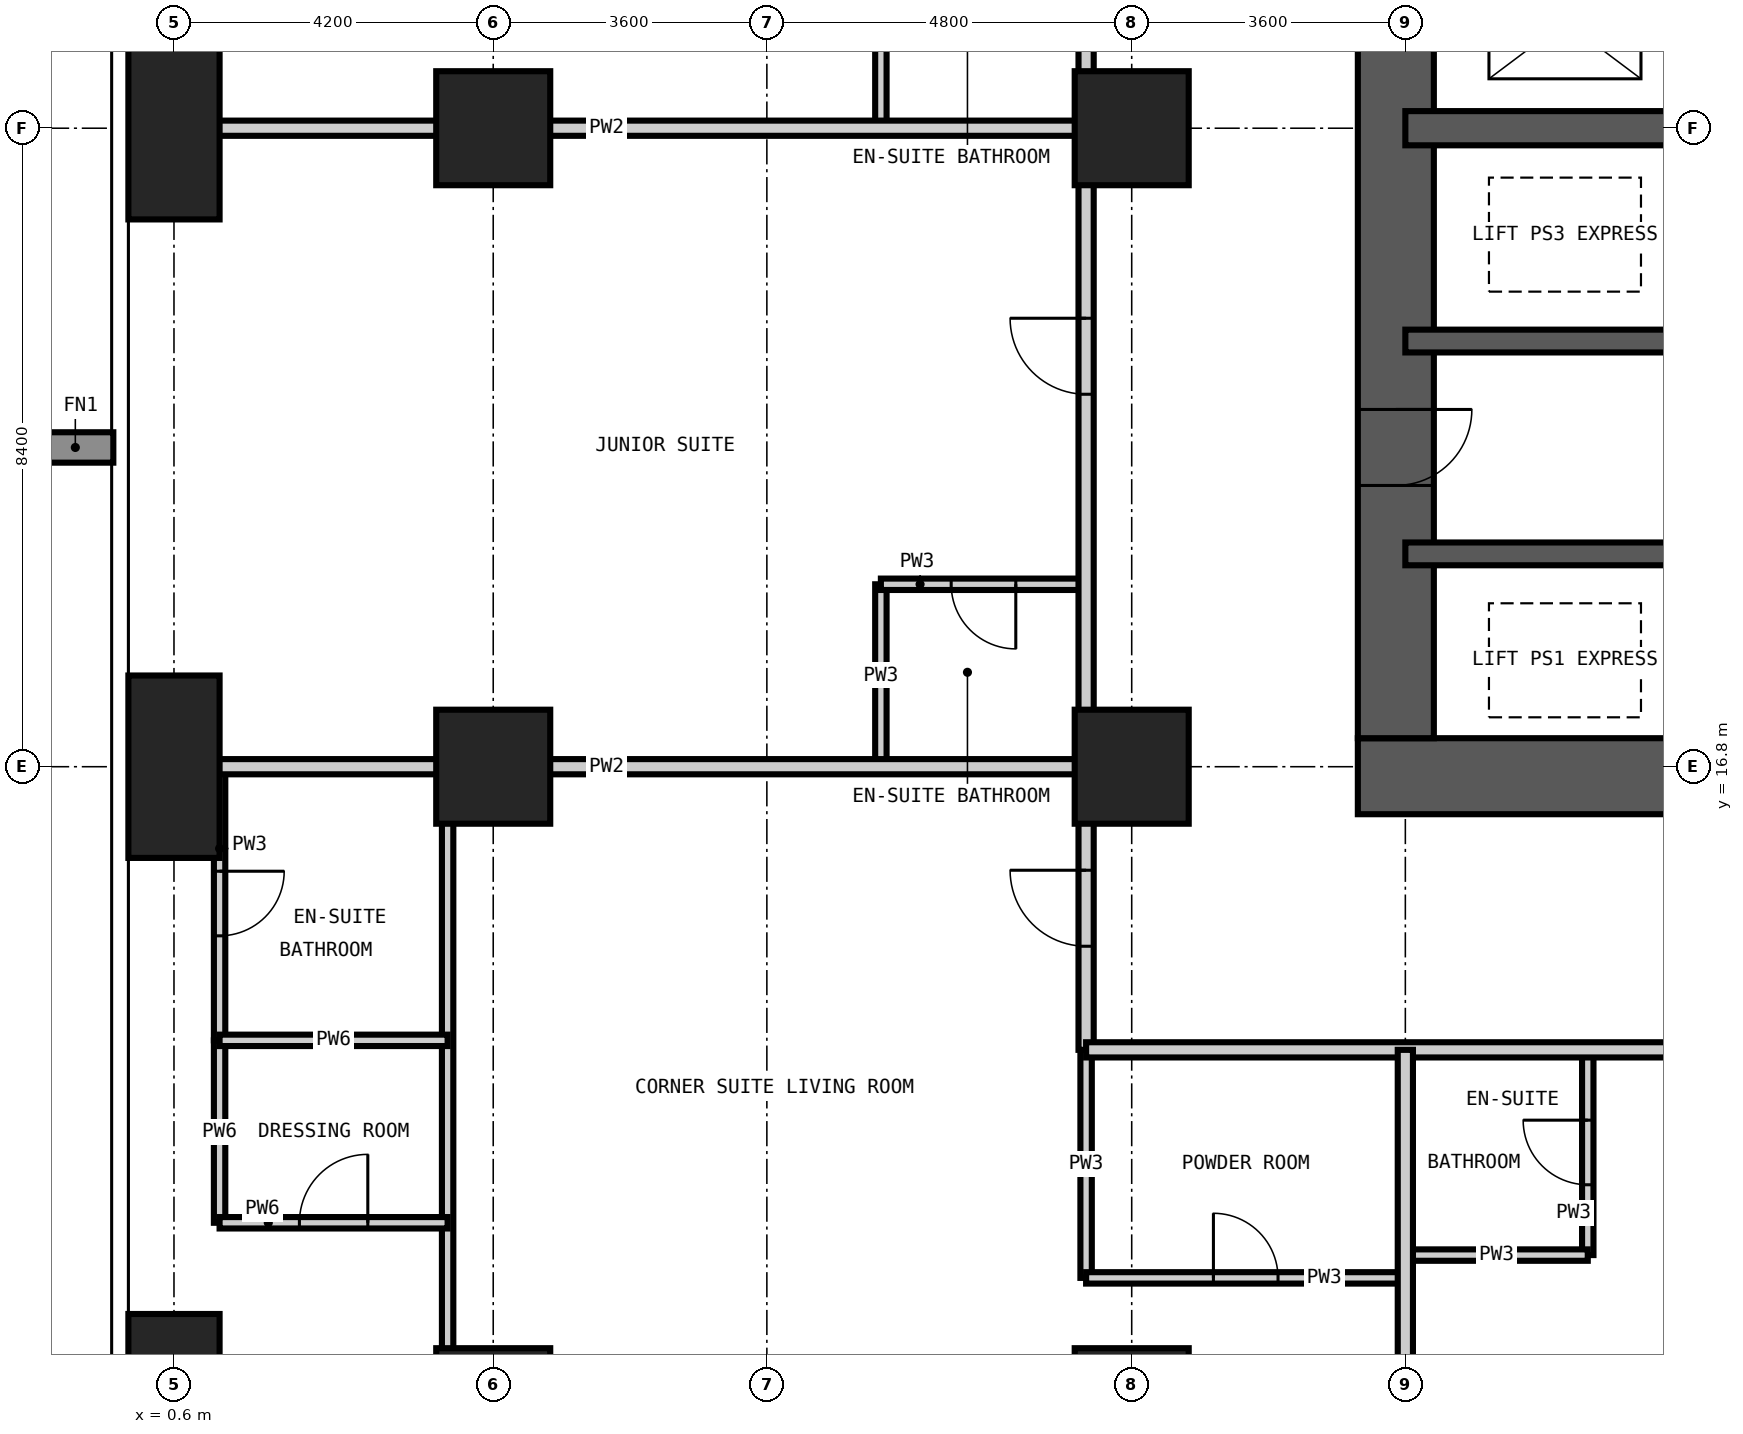
"""IFC4 building model, lengths in metres.
Left out: names, types, materials, properties, quantities, classifications, styles, units other than length and angle.
Written with IfcOpenShell. Run it as: python <this file> out.ifc"""

import sys

from ifc_helpers import new_model, si_unit, direction, frame, frame_2d, origin, origin_2d, place, context, subcontext, project, spatial, rectangle, extrude, element, fill, save


model = new_model("IFC4")
c1 = context("Model", 3, precision=1e-05, world=origin(), true_north=direction((0.0, 1.0)))
c2 = subcontext(c1, "Body", "Model", "MODEL_VIEW")
j1 = project(units=[si_unit("LENGTHUNIT", "METRE"), si_unit("PLANEANGLEUNIT", "RADIAN")], contexts=[c1])
p1 = place(None, origin())
s1 = spatial("IfcSite", under=j1, at=p1, CompositionType="ELEMENT")
p2 = place(p1, origin())
s2 = spatial("IfcBuilding", under=s1, at=p2, CompositionType="ELEMENT")
p3 = place(p2, frame((0.0, 0.0, 118.8)))
s3 = spatial("IfcBuildingStorey", under=s2, at=p3, CompositionType="ELEMENT", Elevation=118.8)
for number, where, z_axis, x_axis in (
    (1, (0.6, 8.4, -0.35), (0.0, 0.0, 1.0), (1.0, 0.0, 0.0)),
    (2, (0.6, 16.8, -0.35), (0.0, 0.0, 1.0), (1.0, 0.0, 0.0)),
    (3, (0.6, 25.2, -0.35), (0.0, 0.0, 1.0), (1.0, 0.0, 0.0)),
):
    element("IfcColumn", number, at=place(p3, frame(where, z_axis=z_axis, x_axis=x_axis)), inside=s3, PredefinedType="COLUMN", context=c2, shape_type="SweptSolid", body=[
        extrude(rectangle(XDim=1.2, YDim=2.4, at=origin_2d()), origin(), (0.0, 0.0, 1.0), 3.6),
    ])
for number, where, z_axis, x_axis in (
    (4, (4.8, 8.4, -0.35), (0.0, 0.0, 1.0), (1.0, 0.0, 0.0)),
    (5, (4.8, 16.8, -0.35), (0.0, 0.0, 1.0), (1.0, 0.0, 0.0)),
    (6, (4.8, 25.2, -0.35), (0.0, 0.0, 1.0), (1.0, 0.0, 0.0)),
    (7, (13.2, 8.4, -0.35), (0.0, 0.0, 1.0), (1.0, 0.0, 0.0)),
    (8, (13.2, 16.8, -0.35), (0.0, 0.0, 1.0), (1.0, 0.0, 0.0)),
    (9, (13.2, 25.2, -0.35), (0.0, 0.0, 1.0), (1.0, 0.0, 0.0)),
):
    element("IfcColumn", number, at=place(p3, frame(where, z_axis=z_axis, x_axis=x_axis)), inside=s3, PredefinedType="COLUMN", context=c2, shape_type="SweptSolid", body=[
        extrude(rectangle(XDim=1.5, YDim=1.5, at=origin_2d()), origin(), (0.0, 0.0, 1.0), 3.6),
    ])
p4 = place(p3, frame((16.175, 16.675, -0.35), z_axis=(0.0, 0.0, 1.0), x_axis=(1.0, 0.0, 0.0)))
e10 = element("IfcWall", 10, at=p4, inside=s3, PredefinedType="SHEAR", context=c2, shape_type="SweptSolid", body=[
    extrude(rectangle(XDim=26.45, YDim=1.0, at=frame_2d((13.225, 0.0))), origin(), (0.0, 0.0, 1.0), 3.6),
])
p5 = place(p4, frame((12.725, 0.0, 0.35)))
e11 = element("IfcOpeningElement", 11, at=p5, cuts=e10, PredefinedType="OPENING", context=c2, shape_type="SweptSolid", body=[
    extrude(rectangle(XDim=1.0, YDim=2.1, at=frame_2d((0.5, 1.05))), frame((0.0, 0.51, 0.0), z_axis=(0.0, -1.0, 0.0), x_axis=(1.0, 0.0, 0.0)), (0.0, 0.0, 1.0), 1.02),
])
p6 = place(p4, frame((19.025, 0.0, 0.35)))
e12 = element("IfcOpeningElement", 12, at=p6, cuts=e10, PredefinedType="OPENING", context=c2, shape_type="SweptSolid", body=[
    extrude(rectangle(XDim=1.0, YDim=2.1, at=frame_2d((0.5, 1.05))), frame((0.0, 0.51, 0.0), z_axis=(0.0, -1.0, 0.0), x_axis=(1.0, 0.0, 0.0)), (0.0, 0.0, 1.0), 1.02),
])
p7 = place(p3, frame((16.675, 41.625, -0.35), z_axis=(0.0, 0.0, 1.0), x_axis=(0.0, -1.0, 0.0)))
e13 = element("IfcWall", 13, at=p7, inside=s3, PredefinedType="SHEAR", context=c2, shape_type="SweptSolid", body=[
    extrude(rectangle(XDim=24.45, YDim=1.0, at=frame_2d((12.225, 0.0))), origin(), (0.0, 0.0, 1.0), 3.6),
])
p8 = place(p7, frame((11.325, 0.0, 0.35)))
e14 = element("IfcOpeningElement", 14, at=p8, cuts=e13, PredefinedType="OPENING", context=c2, shape_type="SweptSolid", body=[
    extrude(rectangle(XDim=1.8, YDim=2.2, at=frame_2d((0.9, 1.1))), frame((0.0, 0.51, 0.0), z_axis=(0.0, -1.0, 0.0), x_axis=(1.0, 0.0, 0.0)), (0.0, 0.0, 1.0), 1.02),
])
p9 = place(p7, frame((20.125, 0.0, 0.35)))
e15 = element("IfcOpeningElement", 15, at=p9, cuts=e13, PredefinedType="OPENING", context=c2, shape_type="SweptSolid", body=[
    extrude(rectangle(XDim=1.0, YDim=2.1, at=frame_2d((0.5, 1.05))), frame((0.0, 0.51, 0.0), z_axis=(0.0, -1.0, 0.0), x_axis=(1.0, 0.0, 0.0)), (0.0, 0.0, 1.0), 1.02),
])
p10 = place(p7, frame((5.425, 0.0, 0.35)))
e16 = element("IfcOpeningElement", 16, at=p10, cuts=e13, PredefinedType="OPENING", context=c2, shape_type="SweptSolid", body=[
    extrude(rectangle(XDim=1.0, YDim=2.1, at=frame_2d((0.5, 1.05))), frame((0.0, 0.51, 0.0), z_axis=(0.0, -1.0, 0.0), x_axis=(1.0, 0.0, 0.0)), (0.0, 0.0, 1.0), 1.02),
])
for number, where, z_axis, x_axis in (
    (17, (16.8, 19.6, -0.35), (0.0, 0.0, 1.0), (1.0, 0.0, 0.0)),
    (18, (16.8, 22.4, -0.35), (0.0, 0.0, 1.0), (1.0, 0.0, 0.0)),
):
    element("IfcWall", number, at=place(p3, frame(where, z_axis=z_axis, x_axis=x_axis)), inside=s3, PredefinedType="SHEAR", context=c2, shape_type="SweptSolid", body=[
        extrude(rectangle(XDim=8.4, YDim=0.3, at=frame_2d((4.2, 0.0))), origin(), (0.0, 0.0, 1.0), 3.6),
    ])
p11 = place(p3, frame((16.8, 25.2, -0.35), z_axis=(0.0, 0.0, 1.0), x_axis=(1.0, 0.0, 0.0)))
e19 = element("IfcWall", 19, at=p11, inside=s3, PredefinedType="SHEAR", context=c2, shape_type="SweptSolid", body=[
    extrude(rectangle(XDim=25.2, YDim=0.45, at=frame_2d((12.6, 0.0))), origin(), (0.0, 0.0, 1.0), 3.6),
])
p12 = place(p3, frame((1.2, 13.2, 0.0), z_axis=(0.0, 0.0, 1.0), x_axis=(0.0, 1.0, 0.0)))
e20 = element("IfcWall", 20, at=p12, inside=s3, PredefinedType="PARTITIONING", context=c2, shape_type="SweptSolid", body=[
    extrude(rectangle(XDim=3.6, YDim=0.15, at=frame_2d((1.8, 0.0))), origin(), (0.0, 0.0, 1.0), 3.25),
])
p13 = place(p12, frame((1.375, 0.0, 0.0)))
e21 = element("IfcOpeningElement", 21, at=p13, cuts=e20, PredefinedType="OPENING", context=c2, shape_type="SweptSolid", body=[
    extrude(rectangle(XDim=0.85, YDim=2.1, at=frame_2d((0.425, 1.05))), frame((0.0, 0.085, 0.0), z_axis=(0.0, -1.0, 0.0), x_axis=(1.0, 0.0, 0.0)), (0.0, 0.0, 1.0), 0.17),
])
p14 = place(p3, frame((9.9, 16.8, 0.0), z_axis=(0.0, 0.0, 1.0), x_axis=(0.0, 1.0, 0.0)))
e22 = element("IfcWall", 22, at=p14, inside=s3, PredefinedType="PARTITIONING", context=c2, shape_type="SweptSolid", body=[
    extrude(rectangle(XDim=2.4, YDim=0.15, at=frame_2d((1.2, 0.0))), origin(), (0.0, 0.0, 1.0), 3.25),
])
p15 = place(p3, frame((9.9, 25.2, 0.0), z_axis=(0.0, 0.0, 1.0), x_axis=(0.0, 1.0, 0.0)))
e23 = element("IfcWall", 23, at=p15, inside=s3, PredefinedType="PARTITIONING", context=c2, shape_type="SweptSolid", body=[
    extrude(rectangle(XDim=2.4, YDim=0.15, at=frame_2d((1.2, 0.0))), origin(), (0.0, 0.0, 1.0), 3.25),
])
p16 = place(p3, frame((12.6, 10.075, 0.0), z_axis=(0.0, 0.0, 1.0), x_axis=(0.0, 1.0, 0.0)))
e24 = element("IfcWall", 24, at=p16, inside=s3, PredefinedType="PARTITIONING", context=c2, shape_type="SweptSolid", body=[
    extrude(rectangle(XDim=3.0, YDim=0.15, at=frame_2d((1.5, 0.0))), origin(), (0.0, 0.0, 1.0), 3.25),
])
p17 = place(p3, frame((19.2, 10.375, 0.0), z_axis=(0.0, 0.0, 1.0), x_axis=(0.0, 1.0, 0.0)))
e25 = element("IfcWall", 25, at=p17, inside=s3, PredefinedType="PARTITIONING", context=c2, shape_type="SweptSolid", body=[
    extrude(rectangle(XDim=2.7, YDim=0.15, at=frame_2d((1.35, 0.0))), origin(), (0.0, 0.0, 1.0), 3.25),
])
p18 = place(p17, frame((0.925, 0.0, 0.0)))
e26 = element("IfcOpeningElement", 26, at=p18, cuts=e25, PredefinedType="OPENING", context=c2, shape_type="SweptSolid", body=[
    extrude(rectangle(XDim=0.85, YDim=2.1, at=frame_2d((0.425, 1.05))), frame((0.0, 0.085, 0.0), z_axis=(0.0, -1.0, 0.0), x_axis=(1.0, 0.0, 0.0)), (0.0, 0.0, 1.0), 0.17),
])
p19 = place(p3, frame((12.6, 10.075, 0.0), z_axis=(0.0, 0.0, 1.0), x_axis=(1.0, 0.0, 0.0)))
e27 = element("IfcWall", 27, at=p19, inside=s3, PredefinedType="PARTITIONING", context=c2, shape_type="SweptSolid", body=[
    extrude(rectangle(XDim=4.2, YDim=0.15, at=frame_2d((2.1, 0.0))), origin(), (0.0, 0.0, 1.0), 3.25),
])
p20 = place(p19, frame((1.675, 0.0, 0.0)))
e28 = element("IfcOpeningElement", 28, at=p20, cuts=e27, PredefinedType="OPENING", context=c2, shape_type="SweptSolid", body=[
    extrude(rectangle(XDim=0.85, YDim=2.1, at=frame_2d((0.425, 1.05))), frame((0.0, 0.085, 0.0), z_axis=(0.0, -1.0, 0.0), x_axis=(1.0, 0.0, 0.0)), (0.0, 0.0, 1.0), 0.17),
])
p21 = place(p3, frame((16.8, 10.375, 0.0), z_axis=(0.0, 0.0, 1.0), x_axis=(1.0, 0.0, 0.0)))
e29 = element("IfcWall", 29, at=p21, inside=s3, PredefinedType="PARTITIONING", context=c2, shape_type="SweptSolid", body=[
    extrude(rectangle(XDim=2.4, YDim=0.15, at=frame_2d((1.2, 0.0))), origin(), (0.0, 0.0, 1.0), 3.25),
])
p22 = place(p3, frame((9.9, 19.2, 0.0), z_axis=(0.0, 0.0, 1.0), x_axis=(1.0, 0.0, 0.0)))
e30 = element("IfcWall", 30, at=p22, inside=s3, PredefinedType="PARTITIONING", context=c2, shape_type="SweptSolid", body=[
    extrude(rectangle(XDim=2.7, YDim=0.15, at=frame_2d((1.35, 0.0))), origin(), (0.0, 0.0, 1.0), 3.25),
])
p23 = place(p22, frame((0.925, 0.0, 0.0)))
e31 = element("IfcOpeningElement", 31, at=p23, cuts=e30, PredefinedType="OPENING", context=c2, shape_type="SweptSolid", body=[
    extrude(rectangle(XDim=0.85, YDim=2.1, at=frame_2d((0.425, 1.05))), frame((0.0, 0.085, 0.0), z_axis=(0.0, -1.0, 0.0), x_axis=(1.0, 0.0, 0.0)), (0.0, 0.0, 1.0), 0.17),
])
p24 = place(p3, frame((12.6, 13.075, 0.0), z_axis=(0.0, 0.0, 1.0), x_axis=(0.0, 1.0, 0.0)))
e32 = element("IfcWall", 32, at=p24, inside=s3, PredefinedType="PARTITIONING", context=c2, shape_type="SweptSolid", body=[
    extrude(rectangle(XDim=31.45, YDim=0.2, at=frame_2d((15.725, 0.0))), origin(), (0.0, 0.0, 1.0), 3.25),
])
p25 = place(p24, frame((8.625, 0.0, 0.0)))
e33 = element("IfcOpeningElement", 33, at=p25, cuts=e32, PredefinedType="OPENING", context=c2, shape_type="SweptSolid", body=[
    extrude(rectangle(XDim=1.0, YDim=2.2, at=frame_2d((0.5, 1.1))), frame((0.0, 0.11, 0.0), z_axis=(0.0, -1.0, 0.0), x_axis=(1.0, 0.0, 0.0)), (0.0, 0.0, 1.0), 0.22),
])
p26 = place(p24, frame((17.025, 0.0, 0.0)))
e34 = element("IfcOpeningElement", 34, at=p26, cuts=e32, PredefinedType="OPENING", context=c2, shape_type="SweptSolid", body=[
    extrude(rectangle(XDim=1.0, YDim=2.2, at=frame_2d((0.5, 1.1))), frame((0.0, 0.11, 0.0), z_axis=(0.0, -1.0, 0.0), x_axis=(1.0, 0.0, 0.0)), (0.0, 0.0, 1.0), 0.22),
])
p27 = place(p24, frame((25.425, 0.0, 0.0)))
e35 = element("IfcOpeningElement", 35, at=p27, cuts=e32, PredefinedType="OPENING", context=c2, shape_type="SweptSolid", body=[
    extrude(rectangle(XDim=1.0, YDim=2.2, at=frame_2d((0.5, 1.1))), frame((0.0, 0.11, 0.0), z_axis=(0.0, -1.0, 0.0), x_axis=(1.0, 0.0, 0.0)), (0.0, 0.0, 1.0), 0.22),
])
p28 = place(p24, frame((1.363, 0.0, 0.0)))
e36 = element("IfcOpeningElement", 36, at=p28, cuts=e32, PredefinedType="OPENING", context=c2, shape_type="SweptSolid", body=[
    extrude(rectangle(XDim=1.0, YDim=2.2, at=frame_2d((0.5, 1.1))), frame((0.0, 0.11, 0.0), z_axis=(0.0, -1.0, 0.0), x_axis=(1.0, 0.0, 0.0)), (0.0, 0.0, 1.0), 0.22),
])
p29 = place(p24, frame((29.788, 0.0, 0.0)))
e37 = element("IfcOpeningElement", 37, at=p29, cuts=e32, PredefinedType="OPENING", context=c2, shape_type="SweptSolid", body=[
    extrude(rectangle(XDim=1.0, YDim=2.2, at=frame_2d((0.5, 1.1))), frame((0.0, 0.11, 0.0), z_axis=(0.0, -1.0, 0.0), x_axis=(1.0, 0.0, 0.0)), (0.0, 0.0, 1.0), 0.22),
])
p30 = place(p3, frame((45.125, 13.075, 0.0), z_axis=(0.0, 0.0, 1.0), x_axis=(-1.0, 0.0, 0.0)))
e38 = element("IfcWall", 38, at=p30, inside=s3, PredefinedType="PARTITIONING", context=c2, shape_type="SweptSolid", body=[
    extrude(rectangle(XDim=32.525, YDim=0.2, at=frame_2d((16.262, 0.0))), origin(), (0.0, 0.0, 1.0), 3.25),
])
p31 = place(p30, frame((22.425, 0.0, 0.0)))
e39 = element("IfcOpeningElement", 39, at=p31, cuts=e38, PredefinedType="OPENING", context=c2, shape_type="SweptSolid", body=[
    extrude(rectangle(XDim=1.0, YDim=2.2, at=frame_2d((0.5, 1.1))), frame((0.0, 0.11, 0.0), z_axis=(0.0, -1.0, 0.0), x_axis=(1.0, 0.0, 0.0)), (0.0, 0.0, 1.0), 0.22),
])
p32 = place(p30, frame((14.025, 0.0, 0.0)))
e40 = element("IfcOpeningElement", 40, at=p32, cuts=e38, PredefinedType="OPENING", context=c2, shape_type="SweptSolid", body=[
    extrude(rectangle(XDim=1.0, YDim=2.2, at=frame_2d((0.5, 1.1))), frame((0.0, 0.11, 0.0), z_axis=(0.0, -1.0, 0.0), x_axis=(1.0, 0.0, 0.0)), (0.0, 0.0, 1.0), 0.22),
])
p33 = place(p30, frame((5.625, 0.0, 0.0)))
e41 = element("IfcOpeningElement", 41, at=p33, cuts=e38, PredefinedType="OPENING", context=c2, shape_type="SweptSolid", body=[
    extrude(rectangle(XDim=1.0, YDim=2.2, at=frame_2d((0.5, 1.1))), frame((0.0, 0.11, 0.0), z_axis=(0.0, -1.0, 0.0), x_axis=(1.0, 0.0, 0.0)), (0.0, 0.0, 1.0), 0.22),
])
p34 = place(p3, frame((16.8, -0.018, 0.0), z_axis=(0.0, 0.0, 1.0), x_axis=(0.0, 1.0, 0.0)))
e42 = element("IfcWall", 42, at=p34, inside=s3, PredefinedType="PARTITIONING", context=c2, shape_type="SweptSolid", body=[
    extrude(rectangle(XDim=13.093, YDim=0.2, at=frame_2d((6.546, 0.0))), origin(), (0.0, 0.0, 1.0), 3.25),
])
for number, where, z_axis, x_axis in (
    (43, (-0.018, 16.8, 0.0), (0.0, 0.0, 1.0), (1.0, 0.0, 0.0)),
    (44, (-0.018, 25.2, 0.0), (0.0, 0.0, 1.0), (1.0, 0.0, 0.0)),
):
    element("IfcWall", number, at=place(p3, frame(where, z_axis=z_axis, x_axis=x_axis)), inside=s3, PredefinedType="PARTITIONING", context=c2, shape_type="SweptSolid", body=[
        extrude(rectangle(XDim=12.618, YDim=0.2, at=frame_2d((6.309, 0.0))), origin(), (0.0, 0.0, 1.0), 3.25),
    ])
p35 = place(p3, frame((1.2, 10.8, 0.0), z_axis=(0.0, 0.0, 1.0), x_axis=(0.0, 1.0, 0.0)))
e45 = element("IfcWall", 45, at=p35, inside=s3, PredefinedType="PARTITIONING", context=c2, shape_type="SweptSolid", body=[
    extrude(rectangle(XDim=2.4, YDim=0.15, at=frame_2d((1.2, 0.0))), origin(), (0.0, 0.0, 1.0), 3.25),
])
p36 = place(p3, frame((4.2, -0.018, 0.0), z_axis=(0.0, 0.0, 1.0), x_axis=(0.0, 1.0, 0.0)))
e46 = element("IfcWall", 46, at=p36, inside=s3, PredefinedType="PARTITIONING", context=c2, shape_type="SweptSolid", body=[
    extrude(rectangle(XDim=16.818, YDim=0.15, at=frame_2d((8.409, 0.0))), origin(), (0.0, 0.0, 1.0), 3.25),
])
p37 = place(p36, frame((4.968, 0.0, 0.0)))
e47 = element("IfcOpeningElement", 47, at=p37, cuts=e46, PredefinedType="OPENING", context=c2, shape_type="SweptSolid", body=[
    extrude(rectangle(XDim=0.9, YDim=2.1, at=frame_2d((0.45, 1.05))), frame((0.0, 0.085, 0.0), z_axis=(0.0, -1.0, 0.0), x_axis=(1.0, 0.0, 0.0)), (0.0, 0.0, 1.0), 0.17),
])
p38 = place(p3, frame((1.2, 10.8, 0.0), z_axis=(0.0, 0.0, 1.0), x_axis=(1.0, 0.0, 0.0)))
e48 = element("IfcWall", 48, at=p38, inside=s3, PredefinedType="PARTITIONING", context=c2, shape_type="SweptSolid", body=[
    extrude(rectangle(XDim=3.0, YDim=0.15, at=frame_2d((1.5, 0.0))), origin(), (0.0, 0.0, 1.0), 3.25),
])
p39 = place(p38, frame((1.05, 0.0, 0.0)))
e49 = element("IfcOpeningElement", 49, at=p39, cuts=e48, PredefinedType="OPENING", context=c2, shape_type="SweptSolid", body=[
    extrude(rectangle(XDim=0.9, YDim=2.1, at=frame_2d((0.45, 1.05))), frame((0.0, 0.085, 0.0), z_axis=(0.0, -1.0, 0.0), x_axis=(1.0, 0.0, 0.0)), (0.0, 0.0, 1.0), 0.17),
])
p40 = place(p3, frame((1.2, 13.2, 0.0), z_axis=(0.0, 0.0, 1.0), x_axis=(1.0, 0.0, 0.0)))
e50 = element("IfcWall", 50, at=p40, inside=s3, PredefinedType="PARTITIONING", context=c2, shape_type="SweptSolid", body=[
    extrude(rectangle(XDim=3.0, YDim=0.15, at=frame_2d((1.5, 0.0))), origin(), (0.0, 0.0, 1.0), 3.25),
])
p41 = place(p18, origin())
e51 = element("IfcDoor", 51, at=p41, inside=s3, OperationType="SINGLE_SWING_RIGHT", PredefinedType="DOOR", context=c2, shape_type="SweptSolid", body=[
    extrude(rectangle(XDim=0.85, YDim=2.1, at=frame_2d((0.425, 1.05))), frame((0.0, 0.025, 0.0), z_axis=(0.0, -1.0, 0.0), x_axis=(1.0, 0.0, 0.0)), (0.0, 0.0, 1.0), 0.05),
])
fill(e26, e51)
p42 = place(p25, origin())
e52 = element("IfcDoor", 52, at=p42, inside=s3, OperationType="SINGLE_SWING_RIGHT", PredefinedType="DOOR", context=c2, shape_type="SweptSolid", body=[
    extrude(rectangle(XDim=1.0, YDim=2.2, at=frame_2d((0.5, 1.1))), frame((0.0, 0.025, 0.0), z_axis=(0.0, -1.0, 0.0), x_axis=(1.0, 0.0, 0.0)), (0.0, 0.0, 1.0), 0.05),
])
fill(e33, e52)
p43 = place(p23, frame((0.85, 0.0, 0.0), z_axis=(0.0, 0.0, 1.0), x_axis=(-1.0, 0.0, 0.0)))
e53 = element("IfcDoor", 53, at=p43, inside=s3, OperationType="SINGLE_SWING_LEFT", PredefinedType="DOOR", context=c2, shape_type="SweptSolid", body=[
    extrude(rectangle(XDim=0.85, YDim=2.1, at=frame_2d((0.425, 1.05))), frame((0.0, 0.025, 0.0), z_axis=(0.0, -1.0, 0.0), x_axis=(1.0, 0.0, 0.0)), (0.0, 0.0, 1.0), 0.05),
])
fill(e31, e53)
p44 = place(p28, origin())
e54 = element("IfcDoor", 54, at=p44, inside=s3, OperationType="SINGLE_SWING_RIGHT", PredefinedType="DOOR", context=c2, shape_type="SweptSolid", body=[
    extrude(rectangle(XDim=1.0, YDim=2.2, at=frame_2d((0.5, 1.1))), frame((0.0, 0.025, 0.0), z_axis=(0.0, -1.0, 0.0), x_axis=(1.0, 0.0, 0.0)), (0.0, 0.0, 1.0), 0.05),
])
fill(e36, e54)
p45 = place(p20, origin())
e55 = element("IfcDoor", 55, at=p45, inside=s3, OperationType="SINGLE_SWING_LEFT", PredefinedType="DOOR", context=c2, shape_type="SweptSolid", body=[
    extrude(rectangle(XDim=0.85, YDim=2.1, at=frame_2d((0.425, 1.05))), frame((0.0, 0.025, 0.0), z_axis=(0.0, -1.0, 0.0), x_axis=(1.0, 0.0, 0.0)), (0.0, 0.0, 1.0), 0.05),
])
fill(e28, e55)
p46 = place(p13, frame((0.85, 0.0, 0.0), z_axis=(0.0, 0.0, 1.0), x_axis=(-1.0, 0.0, 0.0)))
e56 = element("IfcDoor", 56, at=p46, inside=s3, OperationType="SINGLE_SWING_LEFT", PredefinedType="DOOR", context=c2, shape_type="SweptSolid", body=[
    extrude(rectangle(XDim=0.85, YDim=2.1, at=frame_2d((0.425, 1.05))), frame((0.0, 0.025, 0.0), z_axis=(0.0, -1.0, 0.0), x_axis=(1.0, 0.0, 0.0)), (0.0, 0.0, 1.0), 0.05),
])
fill(e21, e56)
p47 = place(p39, origin())
e57 = element("IfcDoor", 57, at=p47, inside=s3, OperationType="SINGLE_SWING_RIGHT", PredefinedType="DOOR", context=c2, shape_type="SweptSolid", body=[
    extrude(rectangle(XDim=0.9, YDim=2.1, at=frame_2d((0.45, 1.05))), frame((0.0, 0.025, 0.0), z_axis=(0.0, -1.0, 0.0), x_axis=(1.0, 0.0, 0.0)), (0.0, 0.0, 1.0), 0.05),
])
fill(e49, e57)
p48 = place(p9, origin())
e58 = element("IfcDoor", 58, at=p48, inside=s3, OperationType="SINGLE_SWING_LEFT", PredefinedType="DOOR", context=c2, shape_type="SweptSolid", body=[
    extrude(rectangle(XDim=1.0, YDim=2.1, at=frame_2d((0.5, 1.05))), frame((0.0, 0.025, 0.0), z_axis=(0.0, -1.0, 0.0), x_axis=(1.0, 0.0, 0.0)), (0.0, 0.0, 1.0), 0.05),
])
fill(e15, e58)
save(model, sys.argv[1])
